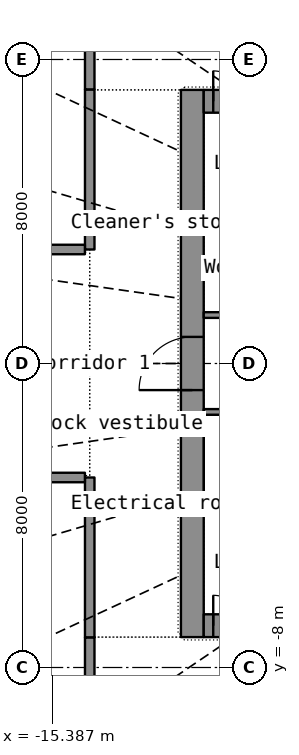
"""IFC4 building model, lengths in metres.
Left out: names, types, materials, properties, quantities, classifications, styles, units other than length and angle.
Written with IfcOpenShell. Run it as: python <this file> out.ifc"""

import sys

from ifc_helpers import new_model, si_unit, direction, frame, frame_2d, origin, place, context, subcontext, project, spatial, rectangle, extrude, element, fill, save


model = new_model("IFC4")
c1 = context("Model", 3, precision=1e-05, world=origin(), true_north=direction((0.0, 1.0)))
c2 = subcontext(c1, "Body", "Model", "MODEL_VIEW")
j1 = project(units=[si_unit("LENGTHUNIT", "METRE"), si_unit("PLANEANGLEUNIT", "RADIAN")], contexts=[c1])
p1 = place(None, origin())
s1 = spatial("IfcSite", under=j1, at=p1, CompositionType="ELEMENT")
p2 = place(p1, origin())
s2 = spatial("IfcBuilding", under=s1, at=p2, CompositionType="ELEMENT")
p3 = place(p2, frame((0.0, 0.0, 7.0)))
s3 = spatial("IfcBuildingStorey", under=s2, at=p3, CompositionType="ELEMENT", Elevation=7.0)
p4 = place(p3, frame((-11.7, -7.2, 0.0), z_axis=(0.0, 0.0, 1.0), x_axis=(0.0, 1.0, 0.0)))
e1 = element("IfcWall", 1, at=p4, inside=s3, PredefinedType="SHEAR", context=c2, shape_type="SweptSolid", body=[
    extrude(rectangle(XDim=14.4, YDim=0.6, at=frame_2d((7.2, 0.0))), origin(), (0.0, 0.0, 1.0), 6.1),
])
p5 = place(p4, frame((6.5, 0.0, 0.0)))
e2 = element("IfcOpeningElement", 2, at=p5, cuts=e1, PredefinedType="OPENING", context=c2, shape_type="SweptSolid", body=[
    extrude(rectangle(XDim=1.4, YDim=2.2, at=frame_2d((0.7, 1.1))), frame((0.0, 0.31, 0.0), z_axis=(0.0, -1.0, 0.0), x_axis=(1.0, 0.0, 0.0)), (0.0, 0.0, 1.0), 0.62),
])
p6 = place(p3, frame((-11.4, -6.9, 0.0), z_axis=(0.0, 0.0, 1.0), x_axis=(1.0, 0.0, 0.0)))
e3 = element("IfcWall", 3, at=p6, inside=s3, PredefinedType="SHEAR", context=c2, shape_type="SweptSolid", body=[
    extrude(rectangle(XDim=22.8, YDim=0.6, at=frame_2d((11.4, 0.0))), origin(), (0.0, 0.0, 1.0), 6.1),
])
p7 = place(p6, frame((1.85, 0.0, 0.0)))
e4 = element("IfcOpeningElement", 4, at=p7, cuts=e3, PredefinedType="OPENING", context=c2, shape_type="SweptSolid", body=[
    extrude(rectangle(XDim=1.1, YDim=2.2, at=frame_2d((0.55, 1.1))), frame((0.0, 0.31, 0.0), z_axis=(0.0, -1.0, 0.0), x_axis=(1.0, 0.0, 0.0)), (0.0, 0.0, 1.0), 0.62),
])
p8 = place(p6, frame((3.85, 0.0, 0.0)))
e5 = element("IfcOpeningElement", 5, at=p8, cuts=e3, PredefinedType="OPENING", context=c2, shape_type="SweptSolid", body=[
    extrude(rectangle(XDim=1.1, YDim=2.2, at=frame_2d((0.55, 1.1))), frame((0.0, 0.31, 0.0), z_axis=(0.0, -1.0, 0.0), x_axis=(1.0, 0.0, 0.0)), (0.0, 0.0, 1.0), 0.62),
])
p9 = place(p6, frame((5.85, 0.0, 0.0)))
e6 = element("IfcOpeningElement", 6, at=p9, cuts=e3, PredefinedType="OPENING", context=c2, shape_type="SweptSolid", body=[
    extrude(rectangle(XDim=1.1, YDim=2.2, at=frame_2d((0.55, 1.1))), frame((0.0, 0.31, 0.0), z_axis=(0.0, -1.0, 0.0), x_axis=(1.0, 0.0, 0.0)), (0.0, 0.0, 1.0), 0.62),
])
p10 = place(p6, frame((7.85, 0.0, 0.0)))
e7 = element("IfcOpeningElement", 7, at=p10, cuts=e3, PredefinedType="OPENING", context=c2, shape_type="SweptSolid", body=[
    extrude(rectangle(XDim=1.1, YDim=2.2, at=frame_2d((0.55, 1.1))), frame((0.0, 0.31, 0.0), z_axis=(0.0, -1.0, 0.0), x_axis=(1.0, 0.0, 0.0)), (0.0, 0.0, 1.0), 0.62),
])
p11 = place(p6, frame((9.85, 0.0, 0.0)))
e8 = element("IfcOpeningElement", 8, at=p11, cuts=e3, PredefinedType="OPENING", context=c2, shape_type="SweptSolid", body=[
    extrude(rectangle(XDim=1.1, YDim=2.2, at=frame_2d((0.55, 1.1))), frame((0.0, 0.31, 0.0), z_axis=(0.0, -1.0, 0.0), x_axis=(1.0, 0.0, 0.0)), (0.0, 0.0, 1.0), 0.62),
])
p12 = place(p6, frame((11.85, 0.0, 0.0)))
e9 = element("IfcOpeningElement", 9, at=p12, cuts=e3, PredefinedType="OPENING", context=c2, shape_type="SweptSolid", body=[
    extrude(rectangle(XDim=1.1, YDim=2.2, at=frame_2d((0.55, 1.1))), frame((0.0, 0.31, 0.0), z_axis=(0.0, -1.0, 0.0), x_axis=(1.0, 0.0, 0.0)), (0.0, 0.0, 1.0), 0.62),
])
p13 = place(p6, frame((13.85, 0.0, 0.0)))
e10 = element("IfcOpeningElement", 10, at=p13, cuts=e3, PredefinedType="OPENING", context=c2, shape_type="SweptSolid", body=[
    extrude(rectangle(XDim=1.1, YDim=2.2, at=frame_2d((0.55, 1.1))), frame((0.0, 0.31, 0.0), z_axis=(0.0, -1.0, 0.0), x_axis=(1.0, 0.0, 0.0)), (0.0, 0.0, 1.0), 0.62),
])
p14 = place(p6, frame((15.85, 0.0, 0.0)))
e11 = element("IfcOpeningElement", 11, at=p14, cuts=e3, PredefinedType="OPENING", context=c2, shape_type="SweptSolid", body=[
    extrude(rectangle(XDim=1.1, YDim=2.2, at=frame_2d((0.55, 1.1))), frame((0.0, 0.31, 0.0), z_axis=(0.0, -1.0, 0.0), x_axis=(1.0, 0.0, 0.0)), (0.0, 0.0, 1.0), 0.62),
])
p15 = place(p6, frame((19.85, 0.0, 0.0)))
e12 = element("IfcOpeningElement", 12, at=p15, cuts=e3, PredefinedType="OPENING", context=c2, shape_type="SweptSolid", body=[
    extrude(rectangle(XDim=1.1, YDim=2.2, at=frame_2d((0.55, 1.1))), frame((0.0, 0.31, 0.0), z_axis=(0.0, -1.0, 0.0), x_axis=(1.0, 0.0, 0.0)), (0.0, 0.0, 1.0), 0.62),
])
p16 = place(p6, frame((0.25, 0.0, 0.0)))
e13 = element("IfcOpeningElement", 13, at=p16, cuts=e3, PredefinedType="OPENING", context=c2, shape_type="SweptSolid", body=[
    extrude(rectangle(XDim=0.8, YDim=2.05, at=frame_2d((0.4, 1.025))), frame((0.0, 0.31, 0.0), z_axis=(0.0, -1.0, 0.0), x_axis=(1.0, 0.0, 0.0)), (0.0, 0.0, 1.0), 0.62),
])
p17 = place(p6, frame((21.75, 0.0, 0.0)))
e14 = element("IfcOpeningElement", 14, at=p17, cuts=e3, PredefinedType="OPENING", context=c2, shape_type="SweptSolid", body=[
    extrude(rectangle(XDim=0.8, YDim=2.05, at=frame_2d((0.4, 1.025))), frame((0.0, 0.31, 0.0), z_axis=(0.0, -1.0, 0.0), x_axis=(1.0, 0.0, 0.0)), (0.0, 0.0, 1.0), 0.62),
])
p18 = place(p3, frame((-11.4, 6.9, 0.0), z_axis=(0.0, 0.0, 1.0), x_axis=(1.0, 0.0, 0.0)))
e15 = element("IfcWall", 15, at=p18, inside=s3, PredefinedType="SHEAR", context=c2, shape_type="SweptSolid", body=[
    extrude(rectangle(XDim=22.8, YDim=0.6, at=frame_2d((11.4, 0.0))), origin(), (0.0, 0.0, 1.0), 6.1),
])
p19 = place(p18, frame((1.85, 0.0, 0.0)))
e16 = element("IfcOpeningElement", 16, at=p19, cuts=e15, PredefinedType="OPENING", context=c2, shape_type="SweptSolid", body=[
    extrude(rectangle(XDim=1.1, YDim=2.2, at=frame_2d((0.55, 1.1))), frame((0.0, 0.31, 0.0), z_axis=(0.0, -1.0, 0.0), x_axis=(1.0, 0.0, 0.0)), (0.0, 0.0, 1.0), 0.62),
])
p20 = place(p18, frame((6.95, 0.0, 0.0)))
e17 = element("IfcOpeningElement", 17, at=p20, cuts=e15, PredefinedType="OPENING", context=c2, shape_type="SweptSolid", body=[
    extrude(rectangle(XDim=0.9, YDim=2.1, at=frame_2d((0.45, 1.05))), frame((0.0, 0.31, 0.0), z_axis=(0.0, -1.0, 0.0), x_axis=(1.0, 0.0, 0.0)), (0.0, 0.0, 1.0), 0.62),
])
p21 = place(p18, frame((11.95, 0.0, 0.0)))
e18 = element("IfcOpeningElement", 18, at=p21, cuts=e15, PredefinedType="OPENING", context=c2, shape_type="SweptSolid", body=[
    extrude(rectangle(XDim=0.9, YDim=2.1, at=frame_2d((0.45, 1.05))), frame((0.0, 0.31, 0.0), z_axis=(0.0, -1.0, 0.0), x_axis=(1.0, 0.0, 0.0)), (0.0, 0.0, 1.0), 0.62),
])
p22 = place(p18, frame((17.95, 0.0, 0.0)))
e19 = element("IfcOpeningElement", 19, at=p22, cuts=e15, PredefinedType="OPENING", context=c2, shape_type="SweptSolid", body=[
    extrude(rectangle(XDim=0.9, YDim=2.1, at=frame_2d((0.45, 1.05))), frame((0.0, 0.31, 0.0), z_axis=(0.0, -1.0, 0.0), x_axis=(1.0, 0.0, 0.0)), (0.0, 0.0, 1.0), 0.62),
])
p23 = place(p18, frame((0.25, 0.0, 0.0)))
e20 = element("IfcOpeningElement", 20, at=p23, cuts=e15, PredefinedType="OPENING", context=c2, shape_type="SweptSolid", body=[
    extrude(rectangle(XDim=0.8, YDim=2.05, at=frame_2d((0.4, 1.025))), frame((0.0, 0.31, 0.0), z_axis=(0.0, -1.0, 0.0), x_axis=(1.0, 0.0, 0.0)), (0.0, 0.0, 1.0), 0.62),
])
p24 = place(p18, frame((21.75, 0.0, 0.0)))
e21 = element("IfcOpeningElement", 21, at=p24, cuts=e15, PredefinedType="OPENING", context=c2, shape_type="SweptSolid", body=[
    extrude(rectangle(XDim=0.8, YDim=2.05, at=frame_2d((0.4, 1.025))), frame((0.0, 0.31, 0.0), z_axis=(0.0, -1.0, 0.0), x_axis=(1.0, 0.0, 0.0)), (0.0, 0.0, 1.0), 0.62),
])
for number, where, z_axis, x_axis in (
    (22, (-11.4, -3.8, 0.0), (0.0, 0.0, 1.0), (1.0, 0.0, 0.0)),
    (23, (-11.4, 3.8, 0.0), (0.0, 0.0, 1.0), (1.0, 0.0, 0.0)),
):
    element("IfcWall", number, at=place(p3, frame(where, z_axis=z_axis, x_axis=x_axis)), inside=s3, PredefinedType="SHEAR", context=c2, shape_type="SweptSolid", body=[
        extrude(rectangle(XDim=22.8, YDim=0.2, at=frame_2d((11.4, 0.0))), origin(), (0.0, 0.0, 1.0), 6.1),
    ])
p25 = place(p3, frame((-11.4, -1.275, 0.0), z_axis=(0.0, 0.0, 1.0), x_axis=(1.0, 0.0, 0.0)))
e24 = element("IfcWall", 24, at=p25, inside=s3, PredefinedType="SHEAR", context=c2, shape_type="SweptSolid", body=[
    extrude(rectangle(XDim=8.4, YDim=0.15, at=frame_2d((4.2, 0.0))), origin(), (0.0, 0.0, 1.0), 6.1),
])
p26 = place(p25, frame((5.25, 0.0, 0.0)))
e25 = element("IfcOpeningElement", 25, at=p26, cuts=e24, PredefinedType="OPENING", context=c2, shape_type="SweptSolid", body=[
    extrude(rectangle(XDim=1.1, YDim=2.15, at=frame_2d((0.55, 1.075))), frame((0.0, 0.085, 0.0), z_axis=(0.0, -1.0, 0.0), x_axis=(1.0, 0.0, 0.0)), (0.0, 0.0, 1.0), 0.17),
])
p27 = place(p25, frame((7.05, 0.0, 0.0)))
e26 = element("IfcOpeningElement", 26, at=p27, cuts=e24, PredefinedType="OPENING", context=c2, shape_type="SweptSolid", body=[
    extrude(rectangle(XDim=0.9, YDim=2.1, at=frame_2d((0.45, 1.05))), frame((0.0, 0.085, 0.0), z_axis=(0.0, -1.0, 0.0), x_axis=(1.0, 0.0, 0.0)), (0.0, 0.0, 1.0), 0.17),
])
p28 = place(p3, frame((-11.4, 1.275, 0.0), z_axis=(0.0, 0.0, 1.0), x_axis=(1.0, 0.0, 0.0)))
e27 = element("IfcWall", 27, at=p28, inside=s3, PredefinedType="PARTITIONING", context=c2, shape_type="SweptSolid", body=[
    extrude(rectangle(XDim=8.4, YDim=0.15, at=frame_2d((4.2, 0.0))), origin(), (0.0, 0.0, 1.0), 6.1),
])
p29 = place(p28, frame((1.114, 0.0, 0.0)))
e28 = element("IfcOpeningElement", 28, at=p29, cuts=e27, PredefinedType="OPENING", context=c2, shape_type="SweptSolid", body=[
    extrude(rectangle(XDim=0.85, YDim=2.1, at=frame_2d((0.425, 1.05))), frame((0.0, 0.085, 0.0), z_axis=(0.0, -1.0, 0.0), x_axis=(1.0, 0.0, 0.0)), (0.0, 0.0, 1.0), 0.17),
])
p30 = place(p28, frame((4.342, 0.0, 0.0)))
e29 = element("IfcOpeningElement", 29, at=p30, cuts=e27, PredefinedType="OPENING", context=c2, shape_type="SweptSolid", body=[
    extrude(rectangle(XDim=0.85, YDim=2.1, at=frame_2d((0.425, 1.05))), frame((0.0, 0.085, 0.0), z_axis=(0.0, -1.0, 0.0), x_axis=(1.0, 0.0, 0.0)), (0.0, 0.0, 1.0), 0.17),
])
p31 = place(p28, frame((6.978, 0.0, 0.0)))
e30 = element("IfcOpeningElement", 30, at=p31, cuts=e27, PredefinedType="OPENING", context=c2, shape_type="SweptSolid", body=[
    extrude(rectangle(XDim=0.9, YDim=2.1, at=frame_2d((0.45, 1.05))), frame((0.0, 0.085, 0.0), z_axis=(0.0, -1.0, 0.0), x_axis=(1.0, 0.0, 0.0)), (0.0, 0.0, 1.0), 0.17),
])
for number, where, z_axis, x_axis in (
    (31, (-14.4, -3.0, 0.0), (0.0, 0.0, 1.0), (0.0, -1.0, 0.0)),
    (32, (-14.4, 7.212, 0.0), (0.0, 0.0, 1.0), (0.0, -1.0, 0.0)),
):
    element("IfcWall", number, at=place(p3, frame(where, z_axis=z_axis, x_axis=x_axis)), inside=s3, PredefinedType="PARTITIONING", context=c2, shape_type="SweptSolid", body=[
        extrude(rectangle(XDim=4.212, YDim=0.25, at=frame_2d((2.106, 0.0))), origin(), (0.0, 0.0, 1.0), 5.1),
    ])
for number, where, z_axis, x_axis in (
    (33, (-14.4, -7.213, 0.0), (0.0, 0.0, 1.0), (0.0, -1.0, 0.0)),
    (34, (-14.4, 10.199, 0.0), (0.0, 0.0, 1.0), (0.0, -1.0, 0.0)),
):
    element("IfcWall", number, at=place(p3, frame(where, z_axis=z_axis, x_axis=x_axis)), inside=s3, PredefinedType="PARTITIONING", context=c2, shape_type="SweptSolid", body=[
        extrude(rectangle(XDim=2.986, YDim=0.25, at=frame_2d((1.493, 0.0))), origin(), (0.0, 0.0, 1.0), 5.1),
    ])
for number, where, z_axis, x_axis in (
    (35, (-17.273, -3.0, 0.0), (0.0, 0.0, 1.0), (1.0, 0.0, 0.0)),
    (36, (-14.527, 3.0, 0.0), (0.0, 0.0, 1.0), (-1.0, 0.0, 0.0)),
):
    element("IfcWall", number, at=place(p3, frame(where, z_axis=z_axis, x_axis=x_axis)), inside=s3, PredefinedType="PARTITIONING", context=c2, shape_type="SweptSolid", body=[
        extrude(rectangle(XDim=2.746, YDim=0.25, at=frame_2d((1.373, 0.0))), origin(), (0.0, 0.0, 1.0), 5.1),
    ])
p32 = place(p16, origin())
e37 = element("IfcDoor", 37, at=p32, inside=s3, OperationType="SINGLE_SWING_LEFT", PredefinedType="DOOR", context=c2, shape_type="SweptSolid", body=[
    extrude(rectangle(XDim=0.8, YDim=2.05, at=frame_2d((0.4, 1.025))), frame((0.0, 0.025, 0.0), z_axis=(0.0, -1.0, 0.0), x_axis=(1.0, 0.0, 0.0)), (0.0, 0.0, 1.0), 0.05),
])
fill(e13, e37)
p33 = place(p23, origin())
e38 = element("IfcDoor", 38, at=p33, inside=s3, OperationType="SINGLE_SWING_LEFT", PredefinedType="DOOR", context=c2, shape_type="SweptSolid", body=[
    extrude(rectangle(XDim=0.8, YDim=2.05, at=frame_2d((0.4, 1.025))), frame((0.0, 0.025, 0.0), z_axis=(0.0, -1.0, 0.0), x_axis=(1.0, 0.0, 0.0)), (0.0, 0.0, 1.0), 0.05),
])
fill(e20, e38)
p34 = place(p5, origin())
e39 = element("IfcDoor", 39, at=p34, inside=s3, OperationType="DOUBLE_DOOR_SINGLE_SWING", PredefinedType="DOOR", context=c2, shape_type="SweptSolid", body=[
    extrude(rectangle(XDim=1.4, YDim=2.2, at=frame_2d((0.7, 1.1))), frame((0.0, 0.025, 0.0), z_axis=(0.0, -1.0, 0.0), x_axis=(1.0, 0.0, 0.0)), (0.0, 0.0, 1.0), 0.05),
])
fill(e2, e39)
save(model, sys.argv[1])
